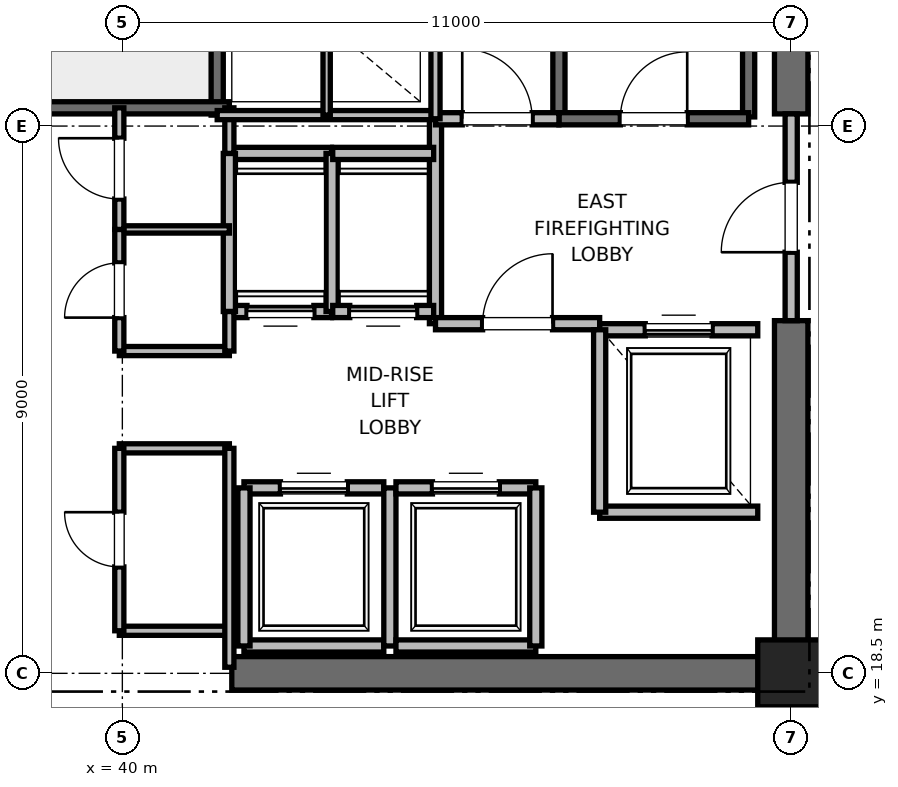
"""IFC4 building model, lengths in metres.
Left out: names, types, materials, properties, quantities, classifications, styles, units other than length and angle.
Written with IfcOpenShell. Run it as: python <this file> out.ifc"""

import sys

from ifc_helpers import new_model, si_unit, direction, frame, frame_2d, origin, origin_2d, place, context, subcontext, project, spatial, rectangle, extrude, element, fill, save


model = new_model("IFC4")
c1 = context("Model", 3, precision=1e-05, world=origin(), true_north=direction((0.0, 1.0)))
c2 = subcontext(c1, "Body", "Model", "MODEL_VIEW")
j1 = project(units=[si_unit("LENGTHUNIT", "METRE"), si_unit("PLANEANGLEUNIT", "RADIAN")], contexts=[c1])
p1 = place(None, origin())
s1 = spatial("IfcSite", under=j1, at=p1, CompositionType="ELEMENT")
p2 = place(p1, origin())
s2 = spatial("IfcBuilding", under=s1, at=p2, CompositionType="ELEMENT")
p3 = place(p2, frame((0.0, 0.0, 118.4)))
s3 = spatial("IfcBuildingStorey", under=s2, at=p3, CompositionType="ELEMENT", Elevation=118.4)
p4 = place(p3, frame((51.0, 18.5, 0.0), z_axis=(0.0, 0.0, 1.0), x_axis=(1.0, 0.0, 0.0)))
e1 = element("IfcColumn", 1, at=p4, inside=s3, PredefinedType="PILASTER", context=c2, shape_type="SweptSolid", body=[
    extrude(rectangle(XDim=1.1, YDim=1.1, at=origin_2d()), origin(), (0.0, 0.0, 1.0), 5.0),
])
p5 = place(p3, frame((41.8, 18.5, 0.0), z_axis=(0.0, 0.0, 1.0), x_axis=(1.0, 0.0, 0.0)))
e2 = element("IfcWall", 2, at=p5, inside=s3, PredefinedType="SHEAR", context=c2, shape_type="SweptSolid", body=[
    extrude(rectangle(XDim=9.2, YDim=0.55, at=frame_2d((4.6, 0.0))), origin(), (0.0, 0.0, 1.0), 4.7),
])
p6 = place(p3, frame((51.0, 18.5, 0.0), z_axis=(0.0, 0.0, 1.0), x_axis=(0.0, 1.0, 0.0)))
e3 = element("IfcWall", 3, at=p6, inside=s3, PredefinedType="SHEAR", context=c2, shape_type="SweptSolid", body=[
    extrude(rectangle(XDim=5.8, YDim=0.55, at=frame_2d((2.9, 0.0))), origin(), (0.0, 0.0, 1.0), 4.7),
])
p7 = place(p3, frame((51.0, 27.7, 0.0), z_axis=(0.0, 0.0, 1.0), x_axis=(0.0, 1.0, 0.0)))
e4 = element("IfcWall", 4, at=p7, inside=s3, PredefinedType="SHEAR", context=c2, shape_type="SweptSolid", body=[
    extrude(rectangle(XDim=8.8, YDim=0.55, at=frame_2d((4.4, 0.0))), origin(), (0.0, 0.0, 1.0), 4.7),
])
p8 = place(p3, frame((50.3, 27.65, 0.0), z_axis=(0.0, 0.0, 1.0), x_axis=(0.0, 1.0, 0.0)))
e5 = element("IfcWall", 5, at=p8, inside=s3, PredefinedType="SOLIDWALL", context=c2, shape_type="SweptSolid", body=[
    extrude(rectangle(XDim=8.15, YDim=0.2, at=frame_2d((4.075, 0.0))), origin(), (0.0, 0.0, 1.0), 4.7),
])
p9 = place(p3, frame((47.18, 27.62, 0.0), z_axis=(0.0, 0.0, 1.0), x_axis=(0.0, 1.0, 0.0)))
e6 = element("IfcWall", 6, at=p9, inside=s3, PredefinedType="SOLIDWALL", context=c2, shape_type="SweptSolid", body=[
    extrude(rectangle(XDim=8.18, YDim=0.2, at=frame_2d((4.09, 0.0))), origin(), (0.0, 0.0, 1.0), 4.7),
])
p10 = place(p3, frame((47.18, 27.62, 0.0), z_axis=(0.0, 0.0, 1.0), x_axis=(1.0, 0.0, 0.0)))
e7 = element("IfcWall", 7, at=p10, inside=s3, PredefinedType="SOLIDWALL", context=c2, shape_type="SweptSolid", body=[
    extrude(rectangle(XDim=3.12, YDim=0.2, at=frame_2d((1.56, 0.0))), origin(), (0.0, 0.0, 1.0), 4.7),
])
p11 = place(p10, frame((1.01, 0.0, 0.0)))
e8 = element("IfcOpeningElement", 8, at=p11, cuts=e7, PredefinedType="OPENING", context=c2, shape_type="SweptSolid", body=[
    extrude(rectangle(XDim=1.1, YDim=2.15, at=frame_2d((0.55, 1.075))), frame((0.0, 0.1, 0.0), z_axis=(0.0, -1.0, 0.0), x_axis=(1.0, 0.0, 0.0)), (0.0, 0.0, 1.0), 0.2),
])
p12 = place(p3, frame((41.56, 27.68, 0.0), z_axis=(0.0, 0.0, 1.0), x_axis=(0.0, 1.0, 0.0)))
e9 = element("IfcWall", 9, at=p12, inside=s3, PredefinedType="SOLIDWALL", context=c2, shape_type="SweptSolid", body=[
    extrude(rectangle(XDim=8.57, YDim=0.2, at=frame_2d((4.285, 0.0))), origin(), (0.0, 0.0, 1.0), 4.7),
])
p13 = place(p3, frame((38.44, 27.8, 0.0), z_axis=(0.0, 0.0, 1.0), x_axis=(1.0, 0.0, 0.0)))
e10 = element("IfcWall", 10, at=p13, inside=s3, PredefinedType="SOLIDWALL", context=c2, shape_type="SweptSolid", body=[
    extrude(rectangle(XDim=3.32, YDim=0.2, at=frame_2d((1.66, 0.0))), origin(), (0.0, 0.0, 1.0), 4.7),
])
p14 = place(p3, frame((45.15, 24.25, 0.0), z_axis=(0.0, 0.0, 1.0), x_axis=(0.0, 1.0, 0.0)))
e11 = element("IfcWall", 11, at=p14, inside=s3, PredefinedType="PARTITIONING", context=c2, shape_type="SweptSolid", body=[
    extrude(rectangle(XDim=3.37, YDim=0.2, at=frame_2d((1.685, 0.0))), origin(), (0.0, 0.0, 1.0), 4.7),
])
p15 = place(p3, frame((45.15, 24.25, 0.0), z_axis=(0.0, 0.0, 1.0), x_axis=(1.0, 0.0, 0.0)))
e12 = element("IfcWall", 12, at=p15, inside=s3, PredefinedType="PARTITIONING", context=c2, shape_type="SweptSolid", body=[
    extrude(rectangle(XDim=2.7, YDim=0.2, at=frame_2d((1.35, 0.0))), origin(), (0.0, 0.0, 1.0), 4.7),
])
p16 = place(p15, frame((0.775, 0.0, 0.0)))
e13 = element("IfcOpeningElement", 13, at=p16, cuts=e12, PredefinedType="OPENING", context=c2, shape_type="SweptSolid", body=[
    extrude(rectangle(XDim=1.15, YDim=2.2, at=frame_2d((0.575, 1.1))), frame((0.0, 0.1, 0.0), z_axis=(0.0, -1.0, 0.0), x_axis=(1.0, 0.0, 0.0)), (0.0, 0.0, 1.0), 0.2),
])
p17 = place(p3, frame((45.15, 27.62, 0.0), z_axis=(0.0, 0.0, 1.0), x_axis=(1.0, 0.0, 0.0)))
e14 = element("IfcWall", 14, at=p17, inside=s3, PredefinedType="PARTITIONING", context=c2, shape_type="SweptSolid", body=[
    extrude(rectangle(XDim=2.03, YDim=0.2, at=frame_2d((1.015, 0.0))), origin(), (0.0, 0.0, 1.0), 4.7),
])
p18 = place(p17, frame((0.44, 0.0, 0.0)))
e15 = element("IfcOpeningElement", 15, at=p18, cuts=e14, PredefinedType="OPENING", context=c2, shape_type="SweptSolid", body=[
    extrude(rectangle(XDim=1.15, YDim=2.2, at=frame_2d((0.575, 1.1))), frame((0.0, 0.1, 0.0), z_axis=(0.0, -1.0, 0.0), x_axis=(1.0, 0.0, 0.0)), (0.0, 0.0, 1.0), 0.2),
])
p19 = place(p3, frame((51.0, 24.3, 0.0), z_axis=(0.0, 0.0, 1.0), x_axis=(0.0, 1.0, 0.0)))
e16 = element("IfcWall", 16, at=p19, inside=s3, PredefinedType="PARTITIONING", context=c2, shape_type="SweptSolid", body=[
    extrude(rectangle(XDim=3.4, YDim=0.2, at=frame_2d((1.7, 0.0))), origin(), (0.0, 0.0, 1.0), 3.68),
])
p20 = place(p19, frame((1.125, 0.0, 0.0)))
e17 = element("IfcOpeningElement", 17, at=p20, cuts=e16, PredefinedType="OPENING", context=c2, shape_type="SweptSolid", body=[
    extrude(rectangle(XDim=1.15, YDim=2.2, at=frame_2d((0.575, 1.1))), frame((0.0, 0.1, 0.0), z_axis=(0.0, -1.0, 0.0), x_axis=(1.0, 0.0, 0.0)), (0.0, 0.0, 1.0), 0.2),
])
p21 = place(p3, frame((47.85, 21.15, 0.0), z_axis=(0.0, 0.0, 1.0), x_axis=(1.0, 0.0, 0.0)))
e18 = element("IfcWall", 18, at=p21, inside=s3, PredefinedType="SOLIDWALL", context=c2, shape_type="SweptSolid", body=[
    extrude(rectangle(XDim=2.6, YDim=0.2, at=frame_2d((1.3, 0.0))), origin(), (0.0, 0.0, 1.0), 4.7),
])
p22 = place(p3, frame((50.45, 24.15, 0.0), z_axis=(0.0, 0.0, 1.0), x_axis=(-1.0, 0.0, 0.0)))
e19 = element("IfcWall", 19, at=p22, inside=s3, PredefinedType="SOLIDWALL", context=c2, shape_type="SweptSolid", body=[
    extrude(rectangle(XDim=2.6, YDim=0.2, at=frame_2d((1.3, 0.0))), origin(), (0.0, 0.0, 1.0), 3.68),
])
p23 = place(p22, frame((0.75, 0.0, 0.0)))
e20 = element("IfcOpeningElement", 20, at=p23, cuts=e19, PredefinedType="OPENING", context=c2, shape_type="SweptSolid", body=[
    extrude(rectangle(XDim=1.1, YDim=2.2, at=frame_2d((0.55, 1.1))), frame((0.0, 0.1, 0.0), z_axis=(0.0, -1.0, 0.0), x_axis=(1.0, 0.0, 0.0)), (0.0, 0.0, 1.0), 0.2),
])
p24 = place(p3, frame((47.85, 24.15, 0.0), z_axis=(0.0, 0.0, 1.0), x_axis=(0.0, -1.0, 0.0)))
e21 = element("IfcWall", 21, at=p24, inside=s3, PredefinedType="SOLIDWALL", context=c2, shape_type="SweptSolid", body=[
    extrude(rectangle(XDim=3.0, YDim=0.2, at=frame_2d((1.5, 0.0))), origin(), (0.0, 0.0, 1.0), 4.7),
])
p25 = place(p3, frame((42.0, 18.95, 0.0), z_axis=(0.0, 0.0, 1.0), x_axis=(1.0, 0.0, 0.0)))
e22 = element("IfcWall", 22, at=p25, inside=s3, PredefinedType="SOLIDWALL", context=c2, shape_type="SweptSolid", body=[
    extrude(rectangle(XDim=2.3, YDim=0.2, at=frame_2d((1.15, 0.0))), origin(), (0.0, 0.0, 1.0), 3.68),
])
p26 = place(p3, frame((44.3, 21.55, 0.0), z_axis=(0.0, 0.0, 1.0), x_axis=(-1.0, 0.0, 0.0)))
e23 = element("IfcWall", 23, at=p26, inside=s3, PredefinedType="SOLIDWALL", context=c2, shape_type="SweptSolid", body=[
    extrude(rectangle(XDim=2.3, YDim=0.2, at=frame_2d((1.15, 0.0))), origin(), (0.0, 0.0, 1.0), 4.7),
])
p27 = place(p26, frame((0.6, 0.0, 0.0)))
e24 = element("IfcOpeningElement", 24, at=p27, cuts=e23, PredefinedType="OPENING", context=c2, shape_type="SweptSolid", body=[
    extrude(rectangle(XDim=1.1, YDim=2.2, at=frame_2d((0.55, 1.1))), frame((0.0, 0.1, 0.0), z_axis=(0.0, -1.0, 0.0), x_axis=(1.0, 0.0, 0.0)), (0.0, 0.0, 1.0), 0.2),
])
p28 = place(p3, frame((42.0, 21.55, 0.0), z_axis=(0.0, 0.0, 1.0), x_axis=(0.0, -1.0, 0.0)))
e25 = element("IfcWall", 25, at=p28, inside=s3, PredefinedType="SOLIDWALL", context=c2, shape_type="SweptSolid", body=[
    extrude(rectangle(XDim=2.6, YDim=0.2, at=frame_2d((1.3, 0.0))), origin(), (0.0, 0.0, 1.0), 3.68),
])
p29 = place(p3, frame((44.4, 18.95, 0.0), z_axis=(0.0, 0.0, 1.0), x_axis=(0.0, 1.0, 0.0)))
e26 = element("IfcWall", 26, at=p29, inside=s3, PredefinedType="SOLIDWALL", context=c2, shape_type="SweptSolid", body=[
    extrude(rectangle(XDim=2.6, YDim=0.2, at=frame_2d((1.3, 0.0))), origin(), (0.0, 0.0, 1.0), 4.7),
])
p30 = place(p3, frame((44.5, 18.95, 0.0), z_axis=(0.0, 0.0, 1.0), x_axis=(1.0, 0.0, 0.0)))
e27 = element("IfcWall", 27, at=p30, inside=s3, PredefinedType="SOLIDWALL", context=c2, shape_type="SweptSolid", body=[
    extrude(rectangle(XDim=2.3, YDim=0.2, at=frame_2d((1.15, 0.0))), origin(), (0.0, 0.0, 1.0), 4.7),
])
p31 = place(p3, frame((46.8, 21.55, 0.0), z_axis=(0.0, 0.0, 1.0), x_axis=(-1.0, 0.0, 0.0)))
e28 = element("IfcWall", 28, at=p31, inside=s3, PredefinedType="SOLIDWALL", context=c2, shape_type="SweptSolid", body=[
    extrude(rectangle(XDim=2.3, YDim=0.2, at=frame_2d((1.15, 0.0))), origin(), (0.0, 0.0, 1.0), 4.7),
])
p32 = place(p31, frame((0.6, 0.0, 0.0)))
e29 = element("IfcOpeningElement", 29, at=p32, cuts=e28, PredefinedType="OPENING", context=c2, shape_type="SweptSolid", body=[
    extrude(rectangle(XDim=1.1, YDim=2.2, at=frame_2d((0.55, 1.1))), frame((0.0, 0.1, 0.0), z_axis=(0.0, -1.0, 0.0), x_axis=(1.0, 0.0, 0.0)), (0.0, 0.0, 1.0), 0.2),
])
p33 = place(p3, frame((46.8, 18.95, 0.0), z_axis=(0.0, 0.0, 1.0), x_axis=(0.0, 1.0, 0.0)))
e30 = element("IfcWall", 30, at=p33, inside=s3, PredefinedType="SOLIDWALL", context=c2, shape_type="SweptSolid", body=[
    extrude(rectangle(XDim=2.6, YDim=0.2, at=frame_2d((1.3, 0.0))), origin(), (0.0, 0.0, 1.0), 4.7),
])
p34 = place(p3, frame((41.76, 24.45, 0.0), z_axis=(0.0, 0.0, 1.0), x_axis=(1.0, 0.0, 0.0)))
e31 = element("IfcWall", 31, at=p34, inside=s3, PredefinedType="SOLIDWALL", context=c2, shape_type="SweptSolid", body=[
    extrude(rectangle(XDim=1.68, YDim=0.2, at=frame_2d((0.84, 0.0))), origin(), (0.0, 0.0, 1.0), 4.7),
])
p35 = place(p34, frame((0.29, 0.0, 0.0)))
e32 = element("IfcOpeningElement", 32, at=p35, cuts=e31, PredefinedType="OPENING", context=c2, shape_type="SweptSolid", body=[
    extrude(rectangle(XDim=1.1, YDim=2.2, at=frame_2d((0.55, 1.1))), frame((0.0, 0.1, 0.0), z_axis=(0.0, -1.0, 0.0), x_axis=(1.0, 0.0, 0.0)), (0.0, 0.0, 1.0), 0.2),
])
p36 = place(p3, frame((43.44, 27.05, 0.0), z_axis=(0.0, 0.0, 1.0), x_axis=(-1.0, 0.0, 0.0)))
e33 = element("IfcWall", 33, at=p36, inside=s3, PredefinedType="SOLIDWALL", context=c2, shape_type="SweptSolid", body=[
    extrude(rectangle(XDim=1.68, YDim=0.2, at=frame_2d((0.84, 0.0))), origin(), (0.0, 0.0, 1.0), 4.7),
])
for number, where, z_axis, x_axis in (
    (34, (41.76, 27.05, 0.0), (0.0, 0.0, 1.0), (0.0, -1.0, 0.0)),
    (35, (43.45, 24.45, 0.0), (0.0, 0.0, 1.0), (0.0, 1.0, 0.0)),
):
    element("IfcWall", number, at=place(p3, frame(where, z_axis=z_axis, x_axis=x_axis)), inside=s3, PredefinedType="SOLIDWALL", context=c2, shape_type="SweptSolid", body=[
        extrude(rectangle(XDim=2.6, YDim=0.2, at=frame_2d((1.3, 0.0))), origin(), (0.0, 0.0, 1.0), 4.7),
    ])
p37 = place(p3, frame((43.46, 24.45, 0.0), z_axis=(0.0, 0.0, 1.0), x_axis=(1.0, 0.0, 0.0)))
e36 = element("IfcWall", 36, at=p37, inside=s3, PredefinedType="SOLIDWALL", context=c2, shape_type="SweptSolid", body=[
    extrude(rectangle(XDim=1.66, YDim=0.2, at=frame_2d((0.83, 0.0))), origin(), (0.0, 0.0, 1.0), 4.7),
])
p38 = place(p37, frame((0.28, 0.0, 0.0)))
e37 = element("IfcOpeningElement", 37, at=p38, cuts=e36, PredefinedType="OPENING", context=c2, shape_type="SweptSolid", body=[
    extrude(rectangle(XDim=1.1, YDim=2.2, at=frame_2d((0.55, 1.1))), frame((0.0, 0.1, 0.0), z_axis=(0.0, -1.0, 0.0), x_axis=(1.0, 0.0, 0.0)), (0.0, 0.0, 1.0), 0.2),
])
p39 = place(p3, frame((45.12, 27.05, 0.0), z_axis=(0.0, 0.0, 1.0), x_axis=(-1.0, 0.0, 0.0)))
e38 = element("IfcWall", 38, at=p39, inside=s3, PredefinedType="SOLIDWALL", context=c2, shape_type="SweptSolid", body=[
    extrude(rectangle(XDim=1.66, YDim=0.2, at=frame_2d((0.83, 0.0))), origin(), (0.0, 0.0, 1.0), 4.7),
])
for number, where, z_axis, x_axis in (
    (39, (39.95, 19.2, 0.0), (0.0, 0.0, 1.0), (1.0, 0.0, 0.0)),
    (40, (39.95, 22.2, 0.0), (0.0, 0.0, 1.0), (1.0, 0.0, 0.0)),
    (41, (39.95, 23.8, 0.0), (0.0, 0.0, 1.0), (1.0, 0.0, 0.0)),
):
    element("IfcWall", number, at=place(p3, frame(where, z_axis=z_axis, x_axis=x_axis)), inside=s3, PredefinedType="PARTITIONING", context=c2, shape_type="SweptSolid", body=[
        extrude(rectangle(XDim=1.81, YDim=0.15, at=frame_2d((0.905, 0.0))), origin(), (0.0, 0.0, 1.0), 2.85),
    ])
p40 = place(p3, frame((39.95, 25.8, 0.0), z_axis=(0.0, 0.0, 1.0), x_axis=(1.0, 0.0, 0.0)))
e42 = element("IfcWall", 42, at=p40, inside=s3, PredefinedType="PARTITIONING", context=c2, shape_type="SweptSolid", body=[
    extrude(rectangle(XDim=1.81, YDim=0.12, at=frame_2d((0.905, 0.0))), origin(), (0.0, 0.0, 1.0), 2.85),
])
p41 = place(p3, frame((41.76, 18.6, 0.0), z_axis=(0.0, 0.0, 1.0), x_axis=(0.0, 1.0, 0.0)))
e43 = element("IfcWall", 43, at=p41, inside=s3, PredefinedType="PARTITIONING", context=c2, shape_type="SweptSolid", body=[
    extrude(rectangle(XDim=3.6, YDim=0.15, at=frame_2d((1.8, 0.0))), origin(), (0.0, 0.0, 1.0), 2.85),
])
p42 = place(p3, frame((41.76, 23.8, 0.0), z_axis=(0.0, 0.0, 1.0), x_axis=(0.0, 1.0, 0.0)))
e44 = element("IfcWall", 44, at=p42, inside=s3, PredefinedType="PARTITIONING", context=c2, shape_type="SweptSolid", body=[
    extrude(rectangle(XDim=0.65, YDim=0.15, at=frame_2d((0.325, 0.0))), origin(), (0.0, 0.0, 1.0), 2.85),
])
p43 = place(p3, frame((41.76, 27.05, 0.0), z_axis=(0.0, 0.0, 1.0), x_axis=(0.0, 1.0, 0.0)))
e45 = element("IfcWall", 45, at=p43, inside=s3, PredefinedType="PARTITIONING", context=c2, shape_type="SweptSolid", body=[
    extrude(rectangle(XDim=0.75, YDim=0.15, at=frame_2d((0.375, 0.0))), origin(), (0.0, 0.0, 1.0), 2.85),
])
p44 = place(p3, frame((39.95, 19.2, 0.0), z_axis=(0.0, 0.0, 1.0), x_axis=(0.0, 1.0, 0.0)))
e46 = element("IfcWall", 46, at=p44, inside=s3, PredefinedType="PARTITIONING", context=c2, shape_type="SweptSolid", body=[
    extrude(rectangle(XDim=3.0, YDim=0.15, at=frame_2d((1.5, 0.0))), origin(), (0.0, 0.0, 1.0), 2.85),
])
p45 = place(p44, frame((1.05, 0.0, 0.0)))
e47 = element("IfcOpeningElement", 47, at=p45, cuts=e46, PredefinedType="OPENING", context=c2, shape_type="SweptSolid", body=[
    extrude(rectangle(XDim=0.9, YDim=2.1, at=frame_2d((0.45, 1.05))), frame((0.0, 0.075, 0.0), z_axis=(0.0, -1.0, 0.0), x_axis=(1.0, 0.0, 0.0)), (0.0, 0.0, 1.0), 0.15),
])
p46 = place(p3, frame((39.95, 23.8, 0.0), z_axis=(0.0, 0.0, 1.0), x_axis=(0.0, 1.0, 0.0)))
e48 = element("IfcWall", 48, at=p46, inside=s3, PredefinedType="PARTITIONING", context=c2, shape_type="SweptSolid", body=[
    extrude(rectangle(XDim=2.0, YDim=0.15, at=frame_2d((1.0, 0.0))), origin(), (0.0, 0.0, 1.0), 2.85),
])
p47 = place(p46, frame((0.55, 0.0, 0.0)))
e49 = element("IfcOpeningElement", 49, at=p47, cuts=e48, PredefinedType="OPENING", context=c2, shape_type="SweptSolid", body=[
    extrude(rectangle(XDim=0.9, YDim=2.1, at=frame_2d((0.45, 1.05))), frame((0.0, 0.075, 0.0), z_axis=(0.0, -1.0, 0.0), x_axis=(1.0, 0.0, 0.0)), (0.0, 0.0, 1.0), 0.15),
])
p48 = place(p3, frame((39.95, 25.8, 0.0), z_axis=(0.0, 0.0, 1.0), x_axis=(0.0, 1.0, 0.0)))
e50 = element("IfcWall", 50, at=p48, inside=s3, PredefinedType="PARTITIONING", context=c2, shape_type="SweptSolid", body=[
    extrude(rectangle(XDim=2.0, YDim=0.15, at=frame_2d((1.0, 0.0))), origin(), (0.0, 0.0, 1.0), 2.85),
])
p49 = place(p48, frame((0.5, 0.0, 0.0)))
e51 = element("IfcOpeningElement", 51, at=p49, cuts=e50, PredefinedType="OPENING", context=c2, shape_type="SweptSolid", body=[
    extrude(rectangle(XDim=1.0, YDim=2.15, at=frame_2d((0.5, 1.075))), frame((0.0, 0.075, 0.0), z_axis=(0.0, -1.0, 0.0), x_axis=(1.0, 0.0, 0.0)), (0.0, 0.0, 1.0), 0.15),
])
p50 = place(p3, frame((41.56, 27.68, 0.0), z_axis=(0.0, 0.0, 1.0), x_axis=(1.0, 0.0, 0.0)))
e52 = element("IfcWall", 52, at=p50, inside=s3, PredefinedType="PARTITIONING", context=c2, shape_type="SweptSolid", body=[
    extrude(rectangle(XDim=3.59, YDim=0.15, at=frame_2d((1.795, 0.0))), origin(), (0.0, 0.0, 1.0), 2.85),
])
p51 = place(p3, frame((45.15, 27.62, 0.0), z_axis=(0.0, 0.0, 1.0), x_axis=(0.0, 1.0, 0.0)))
e53 = element("IfcWall", 53, at=p51, inside=s3, PredefinedType="PARTITIONING", context=c2, shape_type="SweptSolid", body=[
    extrude(rectangle(XDim=3.1, YDim=0.15, at=frame_2d((1.55, 0.0))), origin(), (0.0, 0.0, 1.0), 2.85),
])
p52 = place(p3, frame((43.36, 27.68, 0.0), z_axis=(0.0, 0.0, 1.0), x_axis=(0.0, 1.0, 0.0)))
e54 = element("IfcWall", 54, at=p52, inside=s3, PredefinedType="PARTITIONING", context=c2, shape_type="SweptSolid", body=[
    extrude(rectangle(XDim=3.04, YDim=0.12, at=frame_2d((1.52, 0.0))), origin(), (0.0, 0.0, 1.0), 2.85),
])
p53 = place(p11, origin())
e55 = element("IfcDoor", 55, at=p53, inside=s3, OperationType="SINGLE_SWING_RIGHT", PredefinedType="DOOR", context=c2, shape_type="SweptSolid", body=[
    extrude(rectangle(XDim=1.1, YDim=2.15, at=frame_2d((0.55, 1.075))), frame((0.0, 0.025, 0.0), z_axis=(0.0, -1.0, 0.0), x_axis=(1.0, 0.0, 0.0)), (0.0, 0.0, 1.0), 0.05),
])
fill(e8, e55)
p54 = place(p16, origin())
e56 = element("IfcDoor", 56, at=p54, inside=s3, OperationType="SINGLE_SWING_RIGHT", PredefinedType="DOOR", context=c2, shape_type="SweptSolid", body=[
    extrude(rectangle(XDim=1.15, YDim=2.2, at=frame_2d((0.575, 1.1))), frame((0.0, 0.025, 0.0), z_axis=(0.0, -1.0, 0.0), x_axis=(1.0, 0.0, 0.0)), (0.0, 0.0, 1.0), 0.05),
])
fill(e13, e56)
p55 = place(p18, origin())
e57 = element("IfcDoor", 57, at=p55, inside=s3, OperationType="SINGLE_SWING_LEFT", PredefinedType="DOOR", context=c2, shape_type="SweptSolid", body=[
    extrude(rectangle(XDim=1.15, YDim=2.2, at=frame_2d((0.575, 1.1))), frame((0.0, 0.025, 0.0), z_axis=(0.0, -1.0, 0.0), x_axis=(1.0, 0.0, 0.0)), (0.0, 0.0, 1.0), 0.05),
])
fill(e15, e57)
p56 = place(p20, origin())
e58 = element("IfcDoor", 58, at=p56, inside=s3, OperationType="SINGLE_SWING_LEFT", PredefinedType="DOOR", context=c2, shape_type="SweptSolid", body=[
    extrude(rectangle(XDim=1.15, YDim=2.2, at=frame_2d((0.575, 1.1))), frame((0.0, 0.025, 0.0), z_axis=(0.0, -1.0, 0.0), x_axis=(1.0, 0.0, 0.0)), (0.0, 0.0, 1.0), 0.05),
])
fill(e17, e58)
p57 = place(p23, origin())
e59 = element("IfcDoor", 59, at=p57, inside=s3, OperationType="SLIDING_TO_RIGHT", PredefinedType="DOOR", context=c2, shape_type="SweptSolid", body=[
    extrude(rectangle(XDim=1.1, YDim=2.2, at=frame_2d((0.55, 1.1))), frame((0.0, 0.025, 0.0), z_axis=(0.0, -1.0, 0.0), x_axis=(1.0, 0.0, 0.0)), (0.0, 0.0, 1.0), 0.05),
])
fill(e20, e59)
p58 = place(p27, origin())
e60 = element("IfcDoor", 60, at=p58, inside=s3, OperationType="SLIDING_TO_RIGHT", PredefinedType="DOOR", context=c2, shape_type="SweptSolid", body=[
    extrude(rectangle(XDim=1.1, YDim=2.2, at=frame_2d((0.55, 1.1))), frame((0.0, 0.025, 0.0), z_axis=(0.0, -1.0, 0.0), x_axis=(1.0, 0.0, 0.0)), (0.0, 0.0, 1.0), 0.05),
])
fill(e24, e60)
p59 = place(p32, origin())
e61 = element("IfcDoor", 61, at=p59, inside=s3, OperationType="SLIDING_TO_RIGHT", PredefinedType="DOOR", context=c2, shape_type="SweptSolid", body=[
    extrude(rectangle(XDim=1.1, YDim=2.2, at=frame_2d((0.55, 1.1))), frame((0.0, 0.025, 0.0), z_axis=(0.0, -1.0, 0.0), x_axis=(1.0, 0.0, 0.0)), (0.0, 0.0, 1.0), 0.05),
])
fill(e29, e61)
p60 = place(p35, origin())
e62 = element("IfcDoor", 62, at=p60, inside=s3, OperationType="SLIDING_TO_RIGHT", PredefinedType="DOOR", context=c2, shape_type="SweptSolid", body=[
    extrude(rectangle(XDim=1.1, YDim=2.2, at=frame_2d((0.55, 1.1))), frame((0.0, 0.025, 0.0), z_axis=(0.0, -1.0, 0.0), x_axis=(1.0, 0.0, 0.0)), (0.0, 0.0, 1.0), 0.05),
])
fill(e32, e62)
p61 = place(p38, origin())
e63 = element("IfcDoor", 63, at=p61, inside=s3, OperationType="SLIDING_TO_RIGHT", PredefinedType="DOOR", context=c2, shape_type="SweptSolid", body=[
    extrude(rectangle(XDim=1.1, YDim=2.2, at=frame_2d((0.55, 1.1))), frame((0.0, 0.025, 0.0), z_axis=(0.0, -1.0, 0.0), x_axis=(1.0, 0.0, 0.0)), (0.0, 0.0, 1.0), 0.05),
])
fill(e37, e63)
p62 = place(p45, origin())
e64 = element("IfcDoor", 64, at=p62, inside=s3, OperationType="SINGLE_SWING_RIGHT", PredefinedType="DOOR", context=c2, shape_type="SweptSolid", body=[
    extrude(rectangle(XDim=0.9, YDim=2.1, at=frame_2d((0.45, 1.05))), frame((0.0, 0.025, 0.0), z_axis=(0.0, -1.0, 0.0), x_axis=(1.0, 0.0, 0.0)), (0.0, 0.0, 1.0), 0.05),
])
fill(e47, e64)
p63 = place(p47, origin())
e65 = element("IfcDoor", 65, at=p63, inside=s3, OperationType="SINGLE_SWING_LEFT", PredefinedType="DOOR", context=c2, shape_type="SweptSolid", body=[
    extrude(rectangle(XDim=0.9, YDim=2.1, at=frame_2d((0.45, 1.05))), frame((0.0, 0.025, 0.0), z_axis=(0.0, -1.0, 0.0), x_axis=(1.0, 0.0, 0.0)), (0.0, 0.0, 1.0), 0.05),
])
fill(e49, e65)
p64 = place(p49, origin())
e66 = element("IfcDoor", 66, at=p64, inside=s3, OperationType="SINGLE_SWING_RIGHT", PredefinedType="DOOR", context=c2, shape_type="SweptSolid", body=[
    extrude(rectangle(XDim=1.0, YDim=2.15, at=frame_2d((0.5, 1.075))), frame((0.0, 0.025, 0.0), z_axis=(0.0, -1.0, 0.0), x_axis=(1.0, 0.0, 0.0)), (0.0, 0.0, 1.0), 0.05),
])
fill(e51, e66)
save(model, sys.argv[1])
